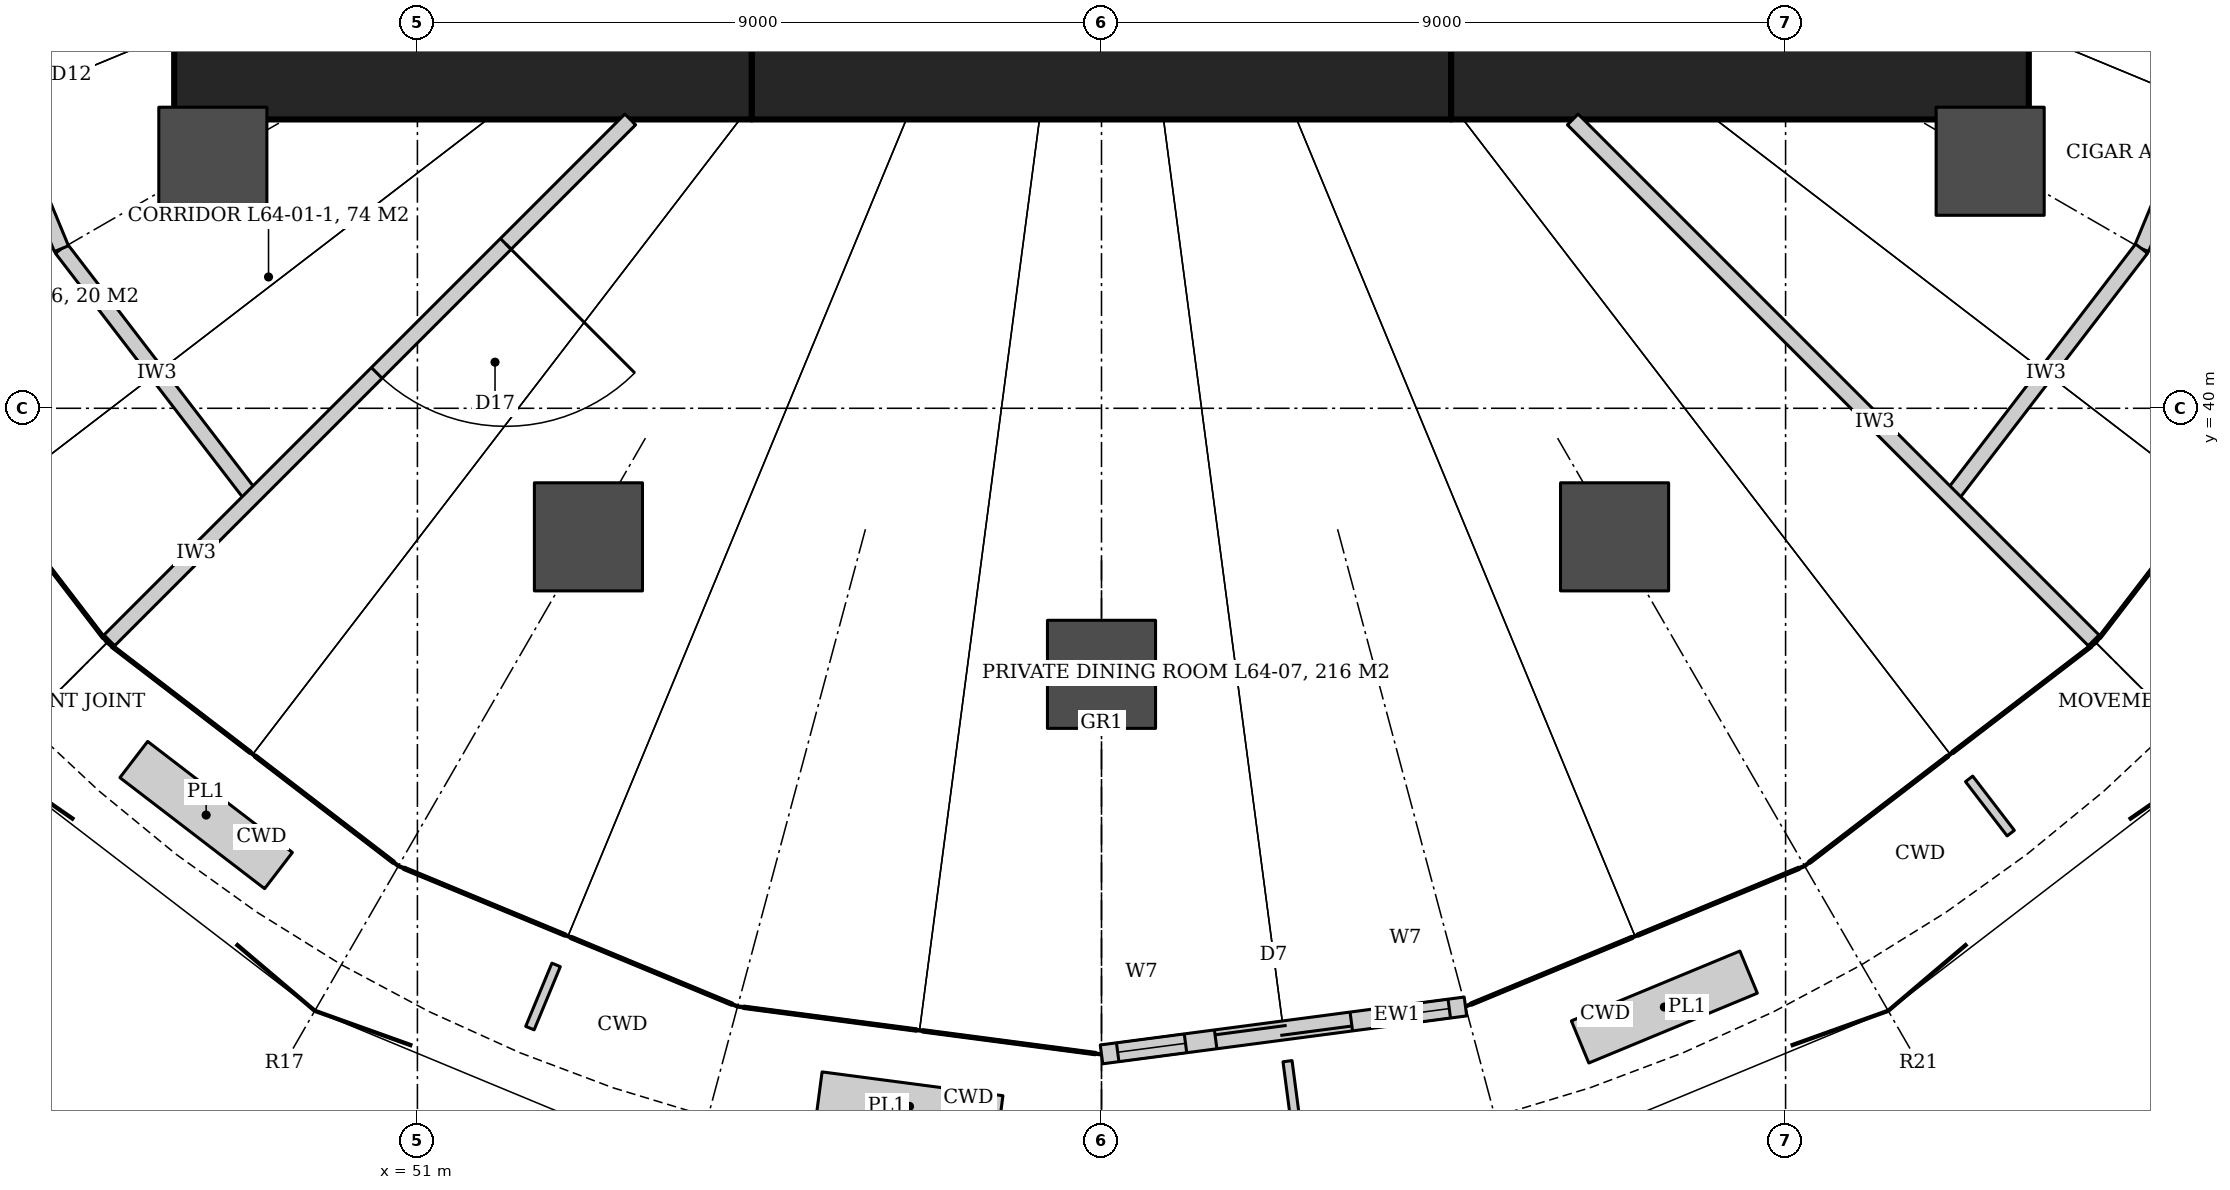
"""IFC4 building model, lengths in metres.
Left out: names, types, materials, properties, quantities, classifications, styles, units other than length and angle.
Written with IfcOpenShell. Run it as: python <this file> out.ifc"""

import sys

from ifc_helpers import new_model, si_unit, direction, frame, frame_2d, origin, origin_2d, place, context, subcontext, project, spatial, rectangle, hollow_circle, extrude, element, fill, save


model = new_model("IFC4")
c1 = context("Model", 3, precision=1e-05, world=origin(), true_north=direction((0.0, 1.0)))
c2 = subcontext(c1, "Body", "Model", "MODEL_VIEW")
j1 = project(units=[si_unit("LENGTHUNIT", "METRE"), si_unit("PLANEANGLEUNIT", "RADIAN")], contexts=[c1])
p1 = place(None, origin())
s1 = spatial("IfcSite", under=j1, at=p1, CompositionType="ELEMENT")
p2 = place(p1, origin())
s2 = spatial("IfcBuilding", under=s1, at=p2, CompositionType="ELEMENT")
p3 = place(p2, frame((0.0, 0.0, 278.0)))
s3 = spatial("IfcBuildingStorey", under=s2, at=p3, CompositionType="ELEMENT", Elevation=278.0)
p4 = place(p3, frame((47.8, 44.55, 0.0), z_axis=(0.0, 0.0, 1.0), x_axis=(1.0, 0.0, 0.0)))
e1 = element("IfcWall", 1, at=p4, inside=s3, PredefinedType="SHEAR", context=c2, shape_type="SweptSolid", body=[
    extrude(rectangle(XDim=7.6, YDim=1.5, at=frame_2d((3.8, 0.0))), origin(), (0.0, 0.0, 1.0), 4.2),
])
p5 = place(p3, frame((55.4, 44.55, 0.0), z_axis=(0.0, 0.0, 1.0), x_axis=(1.0, 0.0, 0.0)))
e2 = element("IfcWall", 2, at=p5, inside=s3, PredefinedType="SHEAR", context=c2, shape_type="SweptSolid", body=[
    extrude(rectangle(XDim=9.2, YDim=1.5, at=frame_2d((4.6, 0.0))), origin(), (0.0, 0.0, 1.0), 4.2),
])
p6 = place(p3, frame((64.6, 44.55, 0.0), z_axis=(0.0, 0.0, 1.0), x_axis=(1.0, 0.0, 0.0)))
e3 = element("IfcWall", 3, at=p6, inside=s3, PredefinedType="SHEAR", context=c2, shape_type="SweptSolid", body=[
    extrude(rectangle(XDim=7.6, YDim=1.5, at=frame_2d((3.8, 0.0))), origin(), (0.0, 0.0, 1.0), 4.2),
])
for number, where, z_axis, x_axis in (
    (4, (48.309, 43.25, 0.0), (0.0, 0.0, 1.0), (1.0, 0.0, 0.0)),
    (5, (53.25, 38.309, 0.0), (0.0, 0.0, 1.0), (1.0, 0.0, 0.0)),
    (6, (60.0, 36.5, 0.0), (0.0, 0.0, 1.0), (1.0, 0.0, 0.0)),
    (7, (66.75, 38.309, 0.0), (0.0, 0.0, 1.0), (1.0, 0.0, 0.0)),
    (8, (71.691, 43.25, 0.0), (0.0, 0.0, 1.0), (1.0, 0.0, 0.0)),
):
    element("IfcColumn", number, at=place(p3, frame(where, z_axis=z_axis, x_axis=x_axis)), inside=s3, PredefinedType="COLUMN", context=c2, shape_type="SweptSolid", body=[
        extrude(hollow_circle(Radius=0.711, WallThickness=0.07, at=origin_2d()), origin(), (0.0, 0.0, 1.0), 4.2),
    ])
p7 = place(p3, frame((48.828, 38.828, 0.0), z_axis=(0.0, 0.0, 1.0), x_axis=(-0.608714823874, 0.793389099494, 0.0)))
e9 = element("IfcWall", 9, at=p7, inside=s3, PredefinedType="PARTITIONING", context=c2, shape_type="SweptSolid", body=[
    extrude(rectangle(XDim=4.125, YDim=0.2, at=frame_2d((2.062, 0.0))), origin(), (0.0, 0.0, 1.0), 3.02),
])
p8 = place(p3, frame((46.317, 42.1, 0.0), z_axis=(0.0, 0.0, 1.0), x_axis=(-0.382731667114, 0.923859551549, 0.0)))
e10 = element("IfcWall", 10, at=p8, inside=s3, PredefinedType="PARTITIONING", context=c2, shape_type="SweptSolid", body=[
    extrude(rectangle(XDim=4.125, YDim=0.2, at=frame_2d((2.062, 0.0))), origin(), (0.0, 0.0, 1.0), 3.02),
])
p9 = place(p8, frame((1.612, 0.0, 0.0)))
e11 = element("IfcOpeningElement", 11, at=p9, cuts=e10, PredefinedType="OPENING", context=c2, shape_type="SweptSolid", body=[
    extrude(rectangle(XDim=0.9, YDim=2.4, at=frame_2d((0.45, 1.2))), frame((0.0, 0.11, 0.0), z_axis=(0.0, -1.0, 0.0), x_axis=(1.0, 0.0, 0.0)), (0.0, 0.0, 1.0), 0.22),
])
p10 = place(p3, frame((75.262, 45.911, 0.0), z_axis=(0.0, 0.0, 1.0), x_axis=(-0.382731667114, -0.923859551549, 0.0)))
e12 = element("IfcWall", 12, at=p10, inside=s3, PredefinedType="PARTITIONING", context=c2, shape_type="SweptSolid", body=[
    extrude(rectangle(XDim=4.125, YDim=0.2, at=frame_2d((2.062, 0.0))), origin(), (0.0, 0.0, 1.0), 3.02),
])
p11 = place(p3, frame((73.683, 42.1, 0.0), z_axis=(0.0, 0.0, 1.0), x_axis=(-0.608714823874, -0.793389099494, 0.0)))
e13 = element("IfcWall", 13, at=p11, inside=s3, PredefinedType="PARTITIONING", context=c2, shape_type="SweptSolid", body=[
    extrude(rectangle(XDim=4.125, YDim=0.2, at=frame_2d((2.062, 0.0))), origin(), (0.0, 0.0, 1.0), 3.02),
])
p12 = place(p3, frame((53.8, 43.8, 0.0), z_axis=(0.0, 0.0, 1.0), x_axis=(-0.707106781187, -0.707106781187, 0.0)))
e14 = element("IfcWall", 14, at=p12, inside=s3, PredefinedType="PARTITIONING", context=c2, shape_type="SweptSolid", body=[
    extrude(rectangle(XDim=9.692, YDim=0.2, at=frame_2d((4.846, 0.0))), origin(), (0.0, 0.0, 1.0), 3.02),
])
p13 = place(p12, frame((2.316, 0.0, 0.0)))
e15 = element("IfcOpeningElement", 15, at=p13, cuts=e14, PredefinedType="OPENING", context=c2, shape_type="SweptSolid", body=[
    extrude(rectangle(XDim=2.4, YDim=2.4, at=frame_2d((1.2, 1.2))), frame((0.0, 0.11, 0.0), z_axis=(0.0, -1.0, 0.0), x_axis=(1.0, 0.0, 0.0)), (0.0, 0.0, 1.0), 0.22),
])
p14 = place(p3, frame((66.2, 43.8, 0.0), z_axis=(0.0, 0.0, 1.0), x_axis=(0.707106781187, -0.707106781187, 0.0)))
e16 = element("IfcWall", 16, at=p14, inside=s3, PredefinedType="PARTITIONING", context=c2, shape_type="SweptSolid", body=[
    extrude(rectangle(XDim=9.692, YDim=0.2, at=frame_2d((4.846, 0.0))), origin(), (0.0, 0.0, 1.0), 3.02),
])
p15 = place(p3, frame((60.0, 31.5, 0.0), z_axis=(0.0, 0.0, 1.0), x_axis=(0.991444657148, 0.130527743461, 0.0)))
e17 = element("IfcWall", 17, at=p15, inside=s3, PredefinedType="SOLIDWALL", context=c2, shape_type="SweptSolid", body=[
    extrude(rectangle(XDim=4.829, YDim=0.25, at=frame_2d((2.415, 0.0))), origin(), (0.0, 0.0, 1.0), 4.04),
])
p16 = place(p15, frame((1.515, 0.0, 0.0)))
e18 = element("IfcOpeningElement", 18, at=p16, cuts=e17, PredefinedType="OPENING", context=c2, shape_type="SweptSolid", body=[
    extrude(rectangle(XDim=1.8, YDim=2.4, at=frame_2d((0.9, 1.2))), frame((0.0, 0.135, 0.0), z_axis=(0.0, -1.0, 0.0), x_axis=(1.0, 0.0, 0.0)), (0.0, 0.0, 1.0), 0.27),
])
p17 = place(p15, frame((0.215, 0.0, 0.0)))
e19 = element("IfcOpeningElement", 19, at=p17, cuts=e17, PredefinedType="OPENING", context=c2, shape_type="SweptSolid", body=[
    extrude(rectangle(XDim=0.9, YDim=2.4, at=frame_2d((0.45, 1.2))), frame((0.0, 0.135, 0.0), z_axis=(0.0, -1.0, 0.0), x_axis=(1.0, 0.0, 0.0)), (0.0, 0.0, 1.0), 0.27),
])
p18 = place(p15, frame((3.715, 0.0, 0.0)))
e20 = element("IfcOpeningElement", 20, at=p18, cuts=e17, PredefinedType="OPENING", context=c2, shape_type="SweptSolid", body=[
    extrude(rectangle(XDim=0.9, YDim=2.4, at=frame_2d((0.45, 1.2))), frame((0.0, 0.135, 0.0), z_axis=(0.0, -1.0, 0.0), x_axis=(1.0, 0.0, 0.0)), (0.0, 0.0, 1.0), 0.27),
])
p19 = place(p13, origin())
e21 = element("IfcDoor", 21, at=p19, inside=s3, OperationType="DOUBLE_DOOR_DOUBLE_SWING", PredefinedType="DOOR", context=c2, shape_type="SweptSolid", body=[
    extrude(rectangle(XDim=2.4, YDim=2.4, at=frame_2d((1.2, 1.2))), frame((0.0, 0.025, 0.0), z_axis=(0.0, -1.0, 0.0), x_axis=(1.0, 0.0, 0.0)), (0.0, 0.0, 1.0), 0.05),
])
fill(e15, e21)
p20 = place(p16, origin())
e22 = element("IfcDoor", 22, at=p20, inside=s3, OperationType="DOUBLE_DOOR_SLIDING", PredefinedType="DOOR", context=c2, shape_type="SweptSolid", body=[
    extrude(rectangle(XDim=1.8, YDim=2.4, at=frame_2d((0.9, 1.2))), frame((0.0, 0.025, 0.0), z_axis=(0.0, -1.0, 0.0), x_axis=(1.0, 0.0, 0.0)), (0.0, 0.0, 1.0), 0.05),
])
fill(e18, e22)
p21 = place(p17, origin())
e23 = element("IfcWindow", 23, at=p21, inside=s3, PartitioningType="SINGLE_PANEL", PredefinedType="WINDOW", context=c2, shape_type="SweptSolid", body=[
    extrude(rectangle(XDim=0.9, YDim=2.4, at=frame_2d((0.45, 1.2))), frame((0.0, 0.03, 0.0), z_axis=(0.0, -1.0, 0.0), x_axis=(1.0, 0.0, 0.0)), (0.0, 0.0, 1.0), 0.06),
])
fill(e19, e23)
p22 = place(p18, origin())
e24 = element("IfcWindow", 24, at=p22, inside=s3, PartitioningType="SINGLE_PANEL", PredefinedType="WINDOW", context=c2, shape_type="SweptSolid", body=[
    extrude(rectangle(XDim=0.9, YDim=2.4, at=frame_2d((0.45, 1.2))), frame((0.0, 0.03, 0.0), z_axis=(0.0, -1.0, 0.0), x_axis=(1.0, 0.0, 0.0)), (0.0, 0.0, 1.0), 0.06),
])
fill(e20, e24)
save(model, sys.argv[1])
